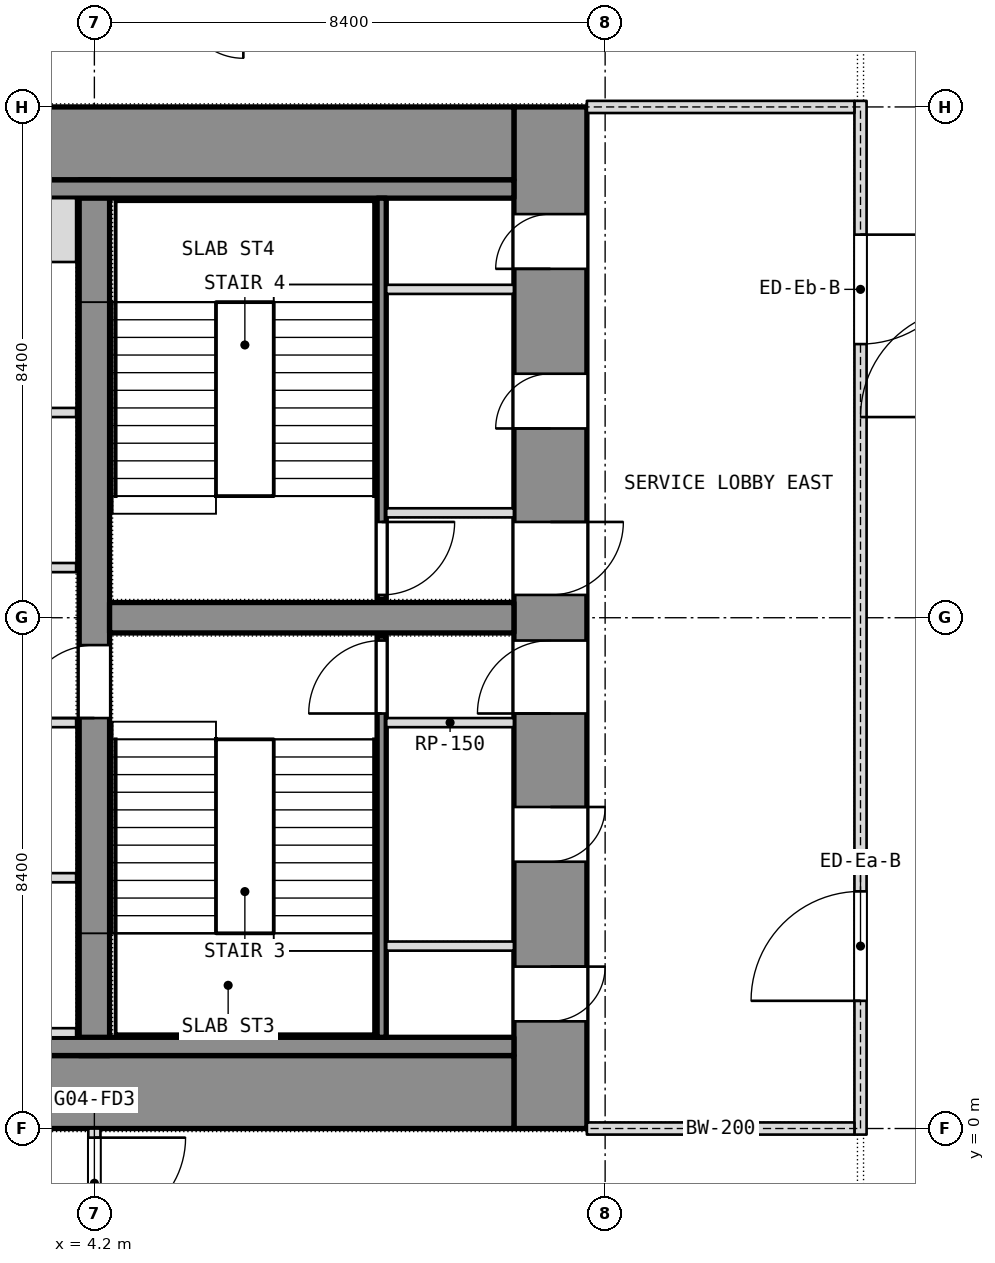
"""IFC4 building model, lengths in metres.
Left out: names, types, materials, properties, quantities, classifications, styles, units other than length and angle.
Written with IfcOpenShell. Run it as: python <this file> out.ifc"""

import sys

from ifc_helpers import new_model, si_unit, direction, frame, frame_2d, origin, place, context, subcontext, project, spatial, rectangle, extrude, element, fill, save


model = new_model("IFC4")
c1 = context("Model", 3, precision=1e-05, world=origin(), true_north=direction((0.0, 1.0)))
c2 = subcontext(c1, "Body", "Model", "MODEL_VIEW")
j1 = project(units=[si_unit("LENGTHUNIT", "METRE"), si_unit("PLANEANGLEUNIT", "RADIAN")], contexts=[c1])
p1 = place(None, origin())
s1 = spatial("IfcSite", under=j1, at=p1, CompositionType="ELEMENT")
p2 = place(p1, origin())
s2 = spatial("IfcBuilding", under=s1, at=p2, CompositionType="ELEMENT")
p3 = place(p2, frame((0.0, 0.0, 61.7)))
s3 = spatial("IfcBuildingStorey", under=s2, at=p3, CompositionType="ELEMENT", Elevation=61.7)
p4 = place(p3, frame((11.7, 0.0, 0.0), z_axis=(0.0, 0.0, 1.0), x_axis=(0.0, 1.0, 0.0)))
e1 = element("IfcWall", 1, at=p4, inside=s3, PredefinedType="SHEAR", context=c2, shape_type="SweptSolid", body=[
    extrude(rectangle(XDim=16.8, YDim=1.2, at=frame_2d((8.4, 0.0))), origin(), (0.0, 0.0, 1.0), 3.6),
])
p5 = place(p4, frame((1.762, 0.0, 0.0)))
e2 = element("IfcOpeningElement", 2, at=p5, cuts=e1, PredefinedType="OPENING", context=c2, shape_type="SweptSolid", body=[
    extrude(rectangle(XDim=0.9, YDim=2.1, at=frame_2d((0.45, 1.05))), frame((0.0, 0.6, 0.0), z_axis=(0.0, -1.0, 0.0), x_axis=(1.0, 0.0, 0.0)), (0.0, 0.0, 1.0), 1.2),
])
p6 = place(p4, frame((4.387, 0.0, 0.0)))
e3 = element("IfcOpeningElement", 3, at=p6, cuts=e1, PredefinedType="OPENING", context=c2, shape_type="SweptSolid", body=[
    extrude(rectangle(XDim=0.9, YDim=2.1, at=frame_2d((0.45, 1.05))), frame((0.0, 0.6, 0.0), z_axis=(0.0, -1.0, 0.0), x_axis=(1.0, 0.0, 0.0)), (0.0, 0.0, 1.0), 1.2),
])
p7 = place(p4, frame((6.825, 0.0, 0.0)))
e4 = element("IfcOpeningElement", 4, at=p7, cuts=e1, PredefinedType="OPENING", context=c2, shape_type="SweptSolid", body=[
    extrude(rectangle(XDim=1.2, YDim=2.1, at=frame_2d((0.6, 1.05))), frame((0.0, 0.6, 0.0), z_axis=(0.0, -1.0, 0.0), x_axis=(1.0, 0.0, 0.0)), (0.0, 0.0, 1.0), 1.2),
])
p8 = place(p4, frame((14.137, 0.0, 0.0)))
e5 = element("IfcOpeningElement", 5, at=p8, cuts=e1, PredefinedType="OPENING", context=c2, shape_type="SweptSolid", body=[
    extrude(rectangle(XDim=0.9, YDim=2.1, at=frame_2d((0.45, 1.05))), frame((0.0, 0.6, 0.0), z_axis=(0.0, -1.0, 0.0), x_axis=(1.0, 0.0, 0.0)), (0.0, 0.0, 1.0), 1.2),
])
p9 = place(p4, frame((11.512, 0.0, 0.0)))
e6 = element("IfcOpeningElement", 6, at=p9, cuts=e1, PredefinedType="OPENING", context=c2, shape_type="SweptSolid", body=[
    extrude(rectangle(XDim=0.9, YDim=2.1, at=frame_2d((0.45, 1.05))), frame((0.0, 0.6, 0.0), z_axis=(0.0, -1.0, 0.0), x_axis=(1.0, 0.0, 0.0)), (0.0, 0.0, 1.0), 1.2),
])
p10 = place(p4, frame((8.775, 0.0, 0.0)))
e7 = element("IfcOpeningElement", 7, at=p10, cuts=e1, PredefinedType="OPENING", context=c2, shape_type="SweptSolid", body=[
    extrude(rectangle(XDim=1.2, YDim=2.1, at=frame_2d((0.6, 1.05))), frame((0.0, 0.6, 0.0), z_axis=(0.0, -1.0, 0.0), x_axis=(1.0, 0.0, 0.0)), (0.0, 0.0, 1.0), 1.2),
])
for number, where, z_axis, x_axis in (
    (8, (-11.1, 0.6, 0.0), (0.0, 0.0, 1.0), (1.0, 0.0, 0.0)),
    (9, (-11.1, 16.2, 0.0), (0.0, 0.0, 1.0), (1.0, 0.0, 0.0)),
):
    element("IfcWall", number, at=place(p3, frame(where, z_axis=z_axis, x_axis=x_axis)), inside=s3, PredefinedType="SHEAR", context=c2, shape_type="SweptSolid", body=[
        extrude(rectangle(XDim=22.2, YDim=1.2, at=frame_2d((11.1, 0.0))), origin(), (0.0, 0.0, 1.0), 3.6),
    ])
p11 = place(p3, frame((4.2, 1.2, 0.0), z_axis=(0.0, 0.0, 1.0), x_axis=(0.0, 1.0, 0.0)))
e10 = element("IfcWall", 10, at=p11, inside=s3, PredefinedType="SHEAR", context=c2, shape_type="SweptSolid", body=[
    extrude(rectangle(XDim=14.4, YDim=0.5, at=frame_2d((7.2, 0.0))), origin(), (0.0, 0.0, 1.0), 3.6),
])
p12 = place(p11, frame((5.55, 0.0, 0.0)))
e11 = element("IfcOpeningElement", 11, at=p12, cuts=e10, PredefinedType="OPENING", context=c2, shape_type="SweptSolid", body=[
    extrude(rectangle(XDim=1.2, YDim=2.1, at=frame_2d((0.6, 1.05))), frame((0.0, 0.25, 0.0), z_axis=(0.0, -1.0, 0.0), x_axis=(1.0, 0.0, 0.0)), (0.0, 0.0, 1.0), 0.5),
])
p13 = place(p3, frame((4.45, 8.4, 0.0), z_axis=(0.0, 0.0, 1.0), x_axis=(1.0, 0.0, 0.0)))
e12 = element("IfcWall", 12, at=p13, inside=s3, PredefinedType="SHEAR", context=c2, shape_type="SweptSolid", body=[
    extrude(rectangle(XDim=6.65, YDim=0.5, at=frame_2d((3.325, 0.0))), origin(), (0.0, 0.0, 1.0), 3.6),
])
p14 = place(p3, frame((4.2, -12.7, 0.0), z_axis=(0.0, 0.0, 1.0), x_axis=(0.0, 1.0, 0.0)))
e13 = element("IfcWall", 13, at=p14, inside=s3, PredefinedType="PARTITIONING", context=c2, shape_type="SweptSolid", body=[
    extrude(rectangle(XDim=12.7, YDim=0.2, at=frame_2d((6.35, 0.0))), origin(), (0.0, 0.0, 1.0), 3.34),
])
p15 = place(p14, frame((11.05, 0.0, 0.0)))
e14 = element("IfcOpeningElement", 14, at=p15, cuts=e13, PredefinedType="OPENING", context=c2, shape_type="SweptSolid", body=[
    extrude(rectangle(XDim=1.5, YDim=2.1, at=frame_2d((0.75, 1.05))), frame((0.0, 0.1, 0.0), z_axis=(0.0, -1.0, 0.0), x_axis=(1.0, 0.0, 0.0)), (0.0, 0.0, 1.0), 0.2),
])
p16 = place(p14, frame((0.25, 0.0, 0.0)))
e15 = element("IfcOpeningElement", 15, at=p16, cuts=e13, PredefinedType="OPENING", context=c2, shape_type="SweptSolid", body=[
    extrude(rectangle(XDim=1.5, YDim=2.1, at=frame_2d((0.75, 1.05))), frame((0.0, 0.1, 0.0), z_axis=(0.0, -1.0, 0.0), x_axis=(1.0, 0.0, 0.0)), (0.0, 0.0, 1.0), 0.2),
])
for number, where, z_axis, x_axis in (
    (16, (-11.1, 1.35, 0.0), (0.0, 0.0, 1.0), (1.0, 0.0, 0.0)),
    (17, (-11.1, 15.45, 0.0), (0.0, 0.0, 1.0), (1.0, 0.0, 0.0)),
):
    element("IfcWall", number, at=place(p3, frame(where, z_axis=z_axis, x_axis=x_axis)), inside=s3, PredefinedType="PARTITIONING", context=c2, shape_type="SweptSolid", body=[
        extrude(rectangle(XDim=22.2, YDim=0.3, at=frame_2d((11.1, 0.0))), origin(), (0.0, 0.0, 1.0), 3.34),
    ])
p17 = place(p3, frame((8.925, 1.5, 0.0), z_axis=(0.0, 0.0, 1.0), x_axis=(0.0, 1.0, 0.0)))
e18 = element("IfcWall", 18, at=p17, inside=s3, PredefinedType="SHEAR", context=c2, shape_type="SweptSolid", body=[
    extrude(rectangle(XDim=6.6, YDim=0.15, at=frame_2d((3.3, 0.0))), origin(), (0.0, 0.0, 1.0), 3.34),
])
p18 = place(p17, frame((5.325, 0.0, 0.0)))
e19 = element("IfcOpeningElement", 19, at=p18, cuts=e18, PredefinedType="OPENING", context=c2, shape_type="SweptSolid", body=[
    extrude(rectangle(XDim=1.2, YDim=2.1, at=frame_2d((0.6, 1.05))), frame((0.0, 0.075, 0.0), z_axis=(0.0, -1.0, 0.0), x_axis=(1.0, 0.0, 0.0)), (0.0, 0.0, 1.0), 0.15),
])
for number, where, z_axis, x_axis in (
    (20, (9.0, 6.675, 0.0), (0.0, 0.0, 1.0), (1.0, 0.0, 0.0)),
    (21, (9.0, 3.0, 0.0), (0.0, 0.0, 1.0), (1.0, 0.0, 0.0)),
):
    element("IfcWall", number, at=place(p3, frame(where, z_axis=z_axis, x_axis=x_axis)), inside=s3, PredefinedType="PARTITIONING", context=c2, shape_type="SweptSolid", body=[
        extrude(rectangle(XDim=2.1, YDim=0.15, at=frame_2d((1.05, 0.0))), origin(), (0.0, 0.0, 1.0), 3.34),
    ])
p19 = place(p3, frame((8.925, 8.7, 0.0), z_axis=(0.0, 0.0, 1.0), x_axis=(0.0, 1.0, 0.0)))
e22 = element("IfcWall", 22, at=p19, inside=s3, PredefinedType="SHEAR", context=c2, shape_type="SweptSolid", body=[
    extrude(rectangle(XDim=6.6, YDim=0.15, at=frame_2d((3.3, 0.0))), origin(), (0.0, 0.0, 1.0), 3.34),
])
p20 = place(p19, frame((0.075, 0.0, 0.0)))
e23 = element("IfcOpeningElement", 23, at=p20, cuts=e22, PredefinedType="OPENING", context=c2, shape_type="SweptSolid", body=[
    extrude(rectangle(XDim=1.2, YDim=2.1, at=frame_2d((0.6, 1.05))), frame((0.0, 0.075, 0.0), z_axis=(0.0, -1.0, 0.0), x_axis=(1.0, 0.0, 0.0)), (0.0, 0.0, 1.0), 0.15),
])
for number, where, z_axis, x_axis in (
    (24, (9.0, 10.125, 0.0), (0.0, 0.0, 1.0), (1.0, 0.0, 0.0)),
    (25, (9.0, 13.8, 0.0), (0.0, 0.0, 1.0), (1.0, 0.0, 0.0)),
):
    element("IfcWall", number, at=place(p3, frame(where, z_axis=z_axis, x_axis=x_axis)), inside=s3, PredefinedType="PARTITIONING", context=c2, shape_type="SweptSolid", body=[
        extrude(rectangle(XDim=2.1, YDim=0.15, at=frame_2d((1.05, 0.0))), origin(), (0.0, 0.0, 1.0), 3.34),
    ])
p21 = place(p3, frame((-3.9, 4.125, 0.0), z_axis=(0.0, 0.0, 1.0), x_axis=(1.0, 0.0, 0.0)))
e26 = element("IfcWall", 26, at=p21, inside=s3, PredefinedType="PARTITIONING", context=c2, shape_type="SweptSolid", body=[
    extrude(rectangle(XDim=7.8, YDim=0.15, at=frame_2d((3.9, 0.0))), origin(), (0.0, 0.0, 1.0), 3.34),
])
p22 = place(p21, frame((3.75, 0.0, 0.0)))
e27 = element("IfcOpeningElement", 27, at=p22, cuts=e26, PredefinedType="OPENING", context=c2, shape_type="SweptSolid", body=[
    extrude(rectangle(XDim=1.2, YDim=2.1, at=frame_2d((0.6, 1.05))), frame((0.0, 0.075, 0.0), z_axis=(0.0, -1.0, 0.0), x_axis=(1.0, 0.0, 0.0)), (0.0, 0.0, 1.0), 0.15),
])
p23 = place(p3, frame((-3.9, 11.775, 0.0), z_axis=(0.0, 0.0, 1.0), x_axis=(1.0, 0.0, 0.0)))
e28 = element("IfcWall", 28, at=p23, inside=s3, PredefinedType="PARTITIONING", context=c2, shape_type="SweptSolid", body=[
    extrude(rectangle(XDim=7.8, YDim=0.15, at=frame_2d((3.9, 0.0))), origin(), (0.0, 0.0, 1.0), 3.34),
])
p24 = place(p23, frame((3.3, 0.0, 0.0)))
e29 = element("IfcOpeningElement", 29, at=p24, cuts=e28, PredefinedType="OPENING", context=c2, shape_type="SweptSolid", body=[
    extrude(rectangle(XDim=1.2, YDim=2.1, at=frame_2d((0.6, 1.05))), frame((0.0, 0.075, 0.0), z_axis=(0.0, -1.0, 0.0), x_axis=(1.0, 0.0, 0.0)), (0.0, 0.0, 1.0), 0.15),
])
p25 = place(p3, frame((1.65, 1.575, 0.0), z_axis=(0.0, 0.0, 1.0), x_axis=(1.0, 0.0, 0.0)))
e30 = element("IfcWall", 30, at=p25, inside=s3, PredefinedType="SHEAR", context=c2, shape_type="SweptSolid", body=[
    extrude(rectangle(XDim=2.25, YDim=0.15, at=frame_2d((1.125, 0.0))), origin(), (0.0, 0.0, 1.0), 3.6),
])
p26 = place(p3, frame((1.65, 14.775, 0.0), z_axis=(0.0, 0.0, 1.0), x_axis=(1.0, 0.0, 0.0)))
e31 = element("IfcWall", 31, at=p26, inside=s3, PredefinedType="SHEAR", context=c2, shape_type="SweptSolid", body=[
    extrude(rectangle(XDim=2.25, YDim=1.05, at=frame_2d((1.125, 0.0))), origin(), (0.0, 0.0, 1.0), 3.6),
])
for number, where, z_axis, x_axis in (
    (32, (1.65, 6.675, 0.0), (0.0, 0.0, 1.0), (1.0, 0.0, 0.0)),
    (33, (1.65, 9.225, 0.0), (0.0, 0.0, 1.0), (1.0, 0.0, 0.0)),
):
    element("IfcWall", number, at=place(p3, frame(where, z_axis=z_axis, x_axis=x_axis)), inside=s3, PredefinedType="SHEAR", context=c2, shape_type="SweptSolid", body=[
        extrude(rectangle(XDim=2.25, YDim=0.15, at=frame_2d((1.125, 0.0))), origin(), (0.0, 0.0, 1.0), 3.6),
    ])
p27 = place(p3, frame((16.8, -0.1, 0.0), z_axis=(0.0, 0.0, 1.0), x_axis=(0.0, 1.0, 0.0)))
e34 = element("IfcWall", 34, at=p27, inside=s3, PredefinedType="PARTITIONING", context=c2, shape_type="SweptSolid", body=[
    extrude(rectangle(XDim=17.0, YDim=0.2, at=frame_2d((8.5, 0.0))), origin(), (0.0, 0.0, 1.0), 3.34),
])
p28 = place(p27, frame((2.2, 0.0, 0.0)))
e35 = element("IfcOpeningElement", 35, at=p28, cuts=e34, PredefinedType="OPENING", context=c2, shape_type="SweptSolid", body=[
    extrude(rectangle(XDim=1.8, YDim=2.1, at=frame_2d((0.9, 1.05))), frame((0.0, 0.1, 0.0), z_axis=(0.0, -1.0, 0.0), x_axis=(1.0, 0.0, 0.0)), (0.0, 0.0, 1.0), 0.2),
])
p29 = place(p27, frame((13.0, 0.0, 0.0)))
e36 = element("IfcOpeningElement", 36, at=p29, cuts=e34, PredefinedType="OPENING", context=c2, shape_type="SweptSolid", body=[
    extrude(rectangle(XDim=1.8, YDim=2.1, at=frame_2d((0.9, 1.05))), frame((0.0, 0.1, 0.0), z_axis=(0.0, -1.0, 0.0), x_axis=(1.0, 0.0, 0.0)), (0.0, 0.0, 1.0), 0.2),
])
for number, where, z_axis, x_axis in (
    (37, (12.3, 0.0, 0.0), (0.0, 0.0, 1.0), (1.0, 0.0, 0.0)),
    (38, (12.3, 16.8, 0.0), (0.0, 0.0, 1.0), (1.0, 0.0, 0.0)),
):
    element("IfcWall", number, at=place(p3, frame(where, z_axis=z_axis, x_axis=x_axis)), inside=s3, PredefinedType="PARTITIONING", context=c2, shape_type="SweptSolid", body=[
        extrude(rectangle(XDim=4.4, YDim=0.2, at=frame_2d((2.2, 0.0))), origin(), (0.0, 0.0, 1.0), 2.84),
    ])
p30 = place(p5, origin())
e39 = element("IfcDoor", 39, at=p30, inside=s3, OperationType="SINGLE_SWING_LEFT", PredefinedType="DOOR", context=c2, shape_type="SweptSolid", body=[
    extrude(rectangle(XDim=0.9, YDim=2.1, at=frame_2d((0.45, 1.05))), frame((0.0, 0.025, 0.0), z_axis=(0.0, -1.0, 0.0), x_axis=(1.0, 0.0, 0.0)), (0.0, 0.0, 1.0), 0.05),
])
fill(e2, e39)
p31 = place(p6, origin())
e40 = element("IfcDoor", 40, at=p31, inside=s3, OperationType="SINGLE_SWING_LEFT", PredefinedType="DOOR", context=c2, shape_type="SweptSolid", body=[
    extrude(rectangle(XDim=0.9, YDim=2.1, at=frame_2d((0.45, 1.05))), frame((0.0, 0.025, 0.0), z_axis=(0.0, -1.0, 0.0), x_axis=(1.0, 0.0, 0.0)), (0.0, 0.0, 1.0), 0.05),
])
fill(e3, e40)
p32 = place(p7, origin())
e41 = element("IfcDoor", 41, at=p32, inside=s3, OperationType="SINGLE_SWING_LEFT", PredefinedType="DOOR", context=c2, shape_type="SweptSolid", body=[
    extrude(rectangle(XDim=1.2, YDim=2.1, at=frame_2d((0.6, 1.05))), frame((0.0, 0.025, 0.0), z_axis=(0.0, -1.0, 0.0), x_axis=(1.0, 0.0, 0.0)), (0.0, 0.0, 1.0), 0.05),
])
fill(e4, e41)
p33 = place(p18, origin())
e42 = element("IfcDoor", 42, at=p33, inside=s3, OperationType="SINGLE_SWING_LEFT", PredefinedType="DOOR", context=c2, shape_type="SweptSolid", body=[
    extrude(rectangle(XDim=1.2, YDim=2.1, at=frame_2d((0.6, 1.05))), frame((0.0, 0.025, 0.0), z_axis=(0.0, -1.0, 0.0), x_axis=(1.0, 0.0, 0.0)), (0.0, 0.0, 1.0), 0.05),
])
fill(e19, e42)
p34 = place(p8, origin())
e43 = element("IfcDoor", 43, at=p34, inside=s3, OperationType="SINGLE_SWING_LEFT", PredefinedType="DOOR", context=c2, shape_type="SweptSolid", body=[
    extrude(rectangle(XDim=0.9, YDim=2.1, at=frame_2d((0.45, 1.05))), frame((0.0, 0.025, 0.0), z_axis=(0.0, -1.0, 0.0), x_axis=(1.0, 0.0, 0.0)), (0.0, 0.0, 1.0), 0.05),
])
fill(e5, e43)
p35 = place(p9, origin())
e44 = element("IfcDoor", 44, at=p35, inside=s3, OperationType="SINGLE_SWING_LEFT", PredefinedType="DOOR", context=c2, shape_type="SweptSolid", body=[
    extrude(rectangle(XDim=0.9, YDim=2.1, at=frame_2d((0.45, 1.05))), frame((0.0, 0.025, 0.0), z_axis=(0.0, -1.0, 0.0), x_axis=(1.0, 0.0, 0.0)), (0.0, 0.0, 1.0), 0.05),
])
fill(e6, e44)
p36 = place(p10, origin())
e45 = element("IfcDoor", 45, at=p36, inside=s3, OperationType="SINGLE_SWING_LEFT", PredefinedType="DOOR", context=c2, shape_type="SweptSolid", body=[
    extrude(rectangle(XDim=1.2, YDim=2.1, at=frame_2d((0.6, 1.05))), frame((0.0, 0.025, 0.0), z_axis=(0.0, -1.0, 0.0), x_axis=(1.0, 0.0, 0.0)), (0.0, 0.0, 1.0), 0.05),
])
fill(e7, e45)
p37 = place(p20, origin())
e46 = element("IfcDoor", 46, at=p37, inside=s3, OperationType="SINGLE_SWING_LEFT", PredefinedType="DOOR", context=c2, shape_type="SweptSolid", body=[
    extrude(rectangle(XDim=1.2, YDim=2.1, at=frame_2d((0.6, 1.05))), frame((0.0, 0.025, 0.0), z_axis=(0.0, -1.0, 0.0), x_axis=(1.0, 0.0, 0.0)), (0.0, 0.0, 1.0), 0.05),
])
fill(e23, e46)
p38 = place(p12, origin())
e47 = element("IfcDoor", 47, at=p38, inside=s3, OperationType="SINGLE_SWING_LEFT", PredefinedType="DOOR", context=c2, shape_type="SweptSolid", body=[
    extrude(rectangle(XDim=1.2, YDim=2.1, at=frame_2d((0.6, 1.05))), frame((0.0, 0.025, 0.0), z_axis=(0.0, -1.0, 0.0), x_axis=(1.0, 0.0, 0.0)), (0.0, 0.0, 1.0), 0.05),
])
fill(e11, e47)
p39 = place(p28, origin())
e48 = element("IfcDoor", 48, at=p39, inside=s3, OperationType="DOUBLE_DOOR_SINGLE_SWING", PredefinedType="DOOR", context=c2, shape_type="SweptSolid", body=[
    extrude(rectangle(XDim=1.8, YDim=2.1, at=frame_2d((0.9, 1.05))), frame((0.0, 0.025, 0.0), z_axis=(0.0, -1.0, 0.0), x_axis=(1.0, 0.0, 0.0)), (0.0, 0.0, 1.0), 0.05),
])
fill(e35, e48)
p40 = place(p29, origin())
e49 = element("IfcDoor", 49, at=p40, inside=s3, OperationType="DOUBLE_DOOR_SINGLE_SWING", PredefinedType="DOOR", context=c2, shape_type="SweptSolid", body=[
    extrude(rectangle(XDim=1.8, YDim=2.1, at=frame_2d((0.9, 1.05))), frame((0.0, 0.025, 0.0), z_axis=(0.0, -1.0, 0.0), x_axis=(1.0, 0.0, 0.0)), (0.0, 0.0, 1.0), 0.05),
])
fill(e36, e49)
p41 = place(p15, origin())
e50 = element("IfcDoor", 50, at=p41, inside=s3, OperationType="DOUBLE_DOOR_DOUBLE_SWING", PredefinedType="DOOR", context=c2, shape_type="SweptSolid", body=[
    extrude(rectangle(XDim=1.5, YDim=2.1, at=frame_2d((0.75, 1.05))), frame((0.0, 0.025, 0.0), z_axis=(0.0, -1.0, 0.0), x_axis=(1.0, 0.0, 0.0)), (0.0, 0.0, 1.0), 0.05),
])
fill(e14, e50)
save(model, sys.argv[1])
